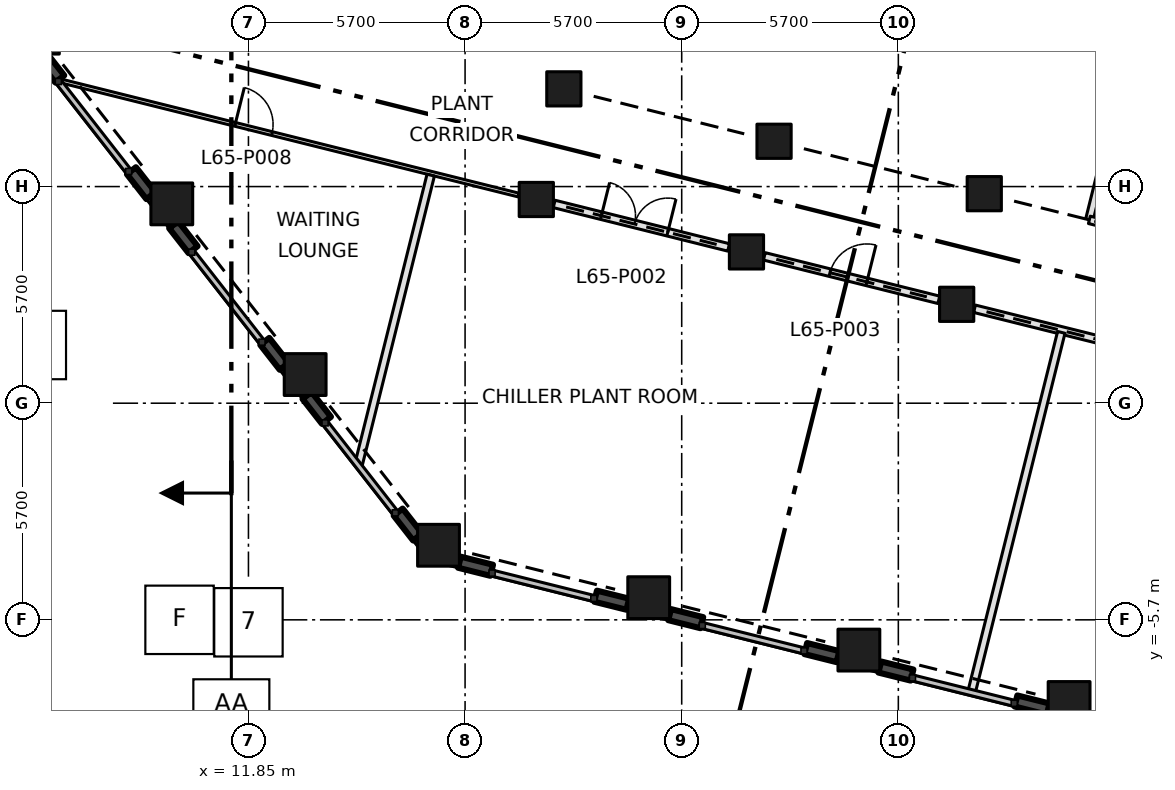
"""IFC4 building model, lengths in metres.
Left out: names, types, materials, properties, quantities, classifications, styles, units other than length and angle.
Written with IfcOpenShell. Run it as: python <this file> out.ifc"""

import sys

from ifc_helpers import new_model, si_unit, direction, frame, frame_2d, origin, origin_2d, place, context, subcontext, project, spatial, rectangle, extrude, element, fill, save


model = new_model("IFC4")
c1 = context("Model", 3, precision=1e-05, world=origin(), true_north=direction((0.0, 1.0)))
c2 = subcontext(c1, "Body", "Model", "MODEL_VIEW")
j1 = project(units=[si_unit("LENGTHUNIT", "METRE"), si_unit("PLANEANGLEUNIT", "RADIAN")], contexts=[c1])
p1 = place(None, origin())
s1 = spatial("IfcSite", under=j1, at=p1, CompositionType="ELEMENT")
p2 = place(p1, origin())
s2 = spatial("IfcBuilding", under=s1, at=p2, CompositionType="ELEMENT")
p3 = place(p2, frame((0.0, 0.0, 284.4)))
s3 = spatial("IfcBuildingStorey", under=s2, at=p3, CompositionType="ELEMENT", Elevation=284.4)
for number, where, z_axis, x_axis in (
    (1, (16.851, -3.738, 0.0), (0.0, 0.0, 1.0), (1.0, 0.0, 0.0)),
    (2, (13.342, 0.754, 0.0), (0.0, 0.0, 1.0), (1.0, 0.0, 0.0)),
    (3, (9.833, 5.245, 0.0), (0.0, 0.0, 1.0), (1.0, 0.0, 0.0)),
    (4, (6.323, 9.737, 0.0), (0.0, 0.0, 1.0), (1.0, 0.0, 0.0)),
    (5, (22.382, -5.117, 0.0), (0.0, 0.0, 1.0), (1.0, 0.0, 0.0)),
    (6, (27.912, -6.496, 0.0), (0.0, 0.0, 1.0), (1.0, 0.0, 0.0)),
    (7, (33.443, -7.875, 0.0), (0.0, 0.0, 1.0), (1.0, 0.0, 0.0)),
):
    element("IfcColumn", number, at=place(p3, frame(where, z_axis=z_axis, x_axis=x_axis)), inside=s3, PredefinedType="COLUMN", context=c2, shape_type="SweptSolid", body=[
        extrude(rectangle(XDim=1.1, YDim=1.1, at=origin_2d()), origin(), (0.0, 0.0, 1.0), 5.4),
    ])
for number, where, z_axis, x_axis in (
    (8, (19.424, 5.36, 0.0), (0.0, 0.0, 1.0), (1.0, 0.0, 0.0)),
    (9, (24.954, 3.981, 0.0), (0.0, 0.0, 1.0), (1.0, 0.0, 0.0)),
    (10, (30.485, 2.602, 0.0), (0.0, 0.0, 1.0), (1.0, 0.0, 0.0)),
    (11, (20.149, 8.271, 0.0), (0.0, 0.0, 1.0), (1.0, 0.0, 0.0)),
    (12, (25.68, 6.892, 0.0), (0.0, 0.0, 1.0), (1.0, 0.0, 0.0)),
    (13, (31.211, 5.513, 0.0), (0.0, 0.0, 1.0), (1.0, 0.0, 0.0)),
):
    element("IfcColumn", number, at=place(p3, frame(where, z_axis=z_axis, x_axis=x_axis)), inside=s3, PredefinedType="COLUMN", context=c2, shape_type="SweptSolid", body=[
        extrude(rectangle(XDim=0.9, YDim=0.9, at=origin_2d()), origin(), (0.0, 0.0, 1.0), 5.4),
    ])
p4 = place(p3, frame((6.822, 8.502, 0.0), z_axis=(0.0, 0.0, 1.0), x_axis=(0.97030423459, -0.241887768058, 0.0)))
e14 = element("IfcWall", 14, at=p4, inside=s3, PredefinedType="PARTITIONING", context=c2, shape_type="SweptSolid", body=[
    extrude(rectangle(XDim=12.503, YDim=0.1, at=frame_2d((6.252, 0.0))), origin(), (0.0, 0.0, 1.0), 5.1),
])
p5 = place(p4, frame((4.821, 0.0, 0.0)))
e15 = element("IfcOpeningElement", 15, at=p5, cuts=e14, PredefinedType="OPENING", context=c2, shape_type="SweptSolid", body=[
    extrude(rectangle(XDim=1.0, YDim=2.1, at=frame_2d((0.5, 1.05))), frame((0.0, 0.06, 0.0), z_axis=(0.0, -1.0, 0.0), x_axis=(1.0, 0.0, 0.0)), (0.0, 0.0, 1.0), 0.12),
])
p6 = place(p3, frame((19.894, 5.243, 0.0), z_axis=(0.0, 0.0, 1.0), x_axis=(0.970324390034, -0.241806902517, 0.0)))
e16 = element("IfcWall", 16, at=p6, inside=s3, PredefinedType="PARTITIONING", context=c2, shape_type="SweptSolid", body=[
    extrude(rectangle(XDim=4.73, YDim=0.2, at=frame_2d((2.365, 0.0))), origin(), (0.0, 0.0, 1.0), 2.61),
])
p7 = place(p6, frame((1.28, 0.0, 0.0)))
e17 = element("IfcOpeningElement", 17, at=p7, cuts=e16, PredefinedType="OPENING", context=c2, shape_type="SweptSolid", body=[
    extrude(rectangle(XDim=1.8, YDim=2.1, at=frame_2d((0.9, 1.05))), frame((0.0, 0.11, 0.0), z_axis=(0.0, -1.0, 0.0), x_axis=(1.0, 0.0, 0.0)), (0.0, 0.0, 1.0), 0.22),
])
p8 = place(p3, frame((25.424, 3.864, 0.0), z_axis=(0.0, 0.0, 1.0), x_axis=(0.970324351393, -0.241807057574, 0.0)))
e18 = element("IfcWall", 18, at=p8, inside=s3, PredefinedType="PARTITIONING", context=c2, shape_type="SweptSolid", body=[
    extrude(rectangle(XDim=4.731, YDim=0.2, at=frame_2d((2.366, 0.0))), origin(), (0.0, 0.0, 1.0), 2.61),
])
p9 = place(p8, frame((1.78, 0.0, 0.0)))
e19 = element("IfcOpeningElement", 19, at=p9, cuts=e18, PredefinedType="OPENING", context=c2, shape_type="SweptSolid", body=[
    extrude(rectangle(XDim=1.0, YDim=2.1, at=frame_2d((0.5, 1.05))), frame((0.0, 0.11, 0.0), z_axis=(0.0, -1.0, 0.0), x_axis=(1.0, 0.0, 0.0)), (0.0, 0.0, 1.0), 0.22),
])
p10 = place(p3, frame((30.955, 2.485, 0.0), z_axis=(0.0, 0.0, 1.0), x_axis=(0.970324351393, -0.241807057574, 0.0)))
e20 = element("IfcWall", 20, at=p10, inside=s3, PredefinedType="PARTITIONING", context=c2, shape_type="SweptSolid", body=[
    extrude(rectangle(XDim=4.731, YDim=0.2, at=frame_2d((2.366, 0.0))), origin(), (0.0, 0.0, 1.0), 2.61),
])
p11 = place(p3, frame((33.976, 4.824, 0.0), z_axis=(0.0, 0.0, 1.0), x_axis=(0.241940400058, 0.970291112409, 0.0)))
e21 = element("IfcWall", 21, at=p11, inside=s3, PredefinedType="PARTITIONING", context=c2, shape_type="SweptSolid", body=[
    extrude(rectangle(XDim=4.922, YDim=0.2, at=frame_2d((2.461, 0.0))), origin(), (0.0, 0.0, 1.0), 5.1),
])
p12 = place(p3, frame((36.272, 4.252, 0.0), z_axis=(0.0, 0.0, 1.0), x_axis=(-0.970336416584, 0.241758637182, 0.0)))
e22 = element("IfcWall", 22, at=p12, inside=s3, PredefinedType="PARTITIONING", context=c2, shape_type="SweptSolid", body=[
    extrude(rectangle(XDim=2.366, YDim=0.2, at=frame_2d((1.183, 0.0))), origin(), (0.0, 0.0, 1.0), 2.61),
])
p13 = place(p3, frame((14.741, -1.64, 0.0), z_axis=(0.0, 0.0, 1.0), x_axis=(0.241900964018, 0.970300944866, 0.0)))
e23 = element("IfcWall", 23, at=p13, inside=s3, PredefinedType="PARTITIONING", context=c2, shape_type="SweptSolid", body=[
    extrude(rectangle(XDim=7.875, YDim=0.2, at=frame_2d((3.938, 0.0))), origin(), (0.0, 0.0, 1.0), 5.1),
])
p14 = place(p3, frame((30.873, -7.621, 0.0), z_axis=(0.0, 0.0, 1.0), x_axis=(0.241947957391, 0.97028922797, 0.0)))
e24 = element("IfcWall", 24, at=p14, inside=s3, PredefinedType="PARTITIONING", context=c2, shape_type="SweptSolid", body=[
    extrude(rectangle(XDim=9.776, YDim=0.2, at=frame_2d((4.888, 0.0))), origin(), (0.0, 0.0, 1.0), 5.1),
])
p15 = place(p3, frame((6.373, 9.187, 2.5), z_axis=(0.0, 0.0, 1.0), x_axis=(0.615601945293, -0.788057259945, 0.0)))
e25 = element("IfcWall", 25, at=p15, inside=s3, PredefinedType="SOLIDWALL", context=c2, shape_type="SweptSolid", body=[
    extrude(rectangle(XDim=4.727, YDim=0.3, at=frame_2d((2.364, 0.0))), origin(), (0.0, 0.0, 1.0), 1.85),
])
for number, where, z_axis, x_axis in (
    (26, (6.373, 9.187, 0.0), (0.0, 0.0, 1.0), (0.616, -0.788, 0.0)),
    (27, (8.771, 6.117, 0.0), (0.0, 0.0, 1.0), (0.616, -0.788, 0.0)),
):
    element("IfcWall", number, at=place(p3, frame(where, z_axis=z_axis, x_axis=x_axis)), inside=s3, PredefinedType="SOLIDWALL", context=c2, shape_type="SweptSolid", body=[
        extrude(rectangle(XDim=0.831, YDim=0.3, at=frame_2d((0.416, 0.0))), origin(), (0.0, 0.0, 1.0), 2.5),
    ])
p16 = place(p3, frame((9.882, 4.695, 2.5), z_axis=(0.0, 0.0, 1.0), x_axis=(0.615702182059, -0.787978948328, 0.0)))
e28 = element("IfcWall", 28, at=p16, inside=s3, PredefinedType="SOLIDWALL", context=c2, shape_type="SweptSolid", body=[
    extrude(rectangle(XDim=4.726, YDim=0.3, at=frame_2d((2.363, 0.0))), origin(), (0.0, 0.0, 1.0), 1.85),
])
for number, where, z_axis, x_axis in (
    (29, (9.882, 4.695, 0.0), (0.0, 0.0, 1.0), (0.616, -0.788, 0.0)),
    (30, (12.28, 1.626, 0.0), (0.0, 0.0, 1.0), (0.616, -0.788, 0.0)),
):
    element("IfcWall", number, at=place(p3, frame(where, z_axis=z_axis, x_axis=x_axis)), inside=s3, PredefinedType="SOLIDWALL", context=c2, shape_type="SweptSolid", body=[
        extrude(rectangle(XDim=0.831, YDim=0.3, at=frame_2d((0.416, 0.0))), origin(), (0.0, 0.0, 1.0), 2.5),
    ])
p17 = place(p3, frame((13.391, 0.204, 2.5), z_axis=(0.0, 0.0, 1.0), x_axis=(0.615702182059, -0.787978948328, 0.0)))
e31 = element("IfcWall", 31, at=p17, inside=s3, PredefinedType="SOLIDWALL", context=c2, shape_type="SweptSolid", body=[
    extrude(rectangle(XDim=4.726, YDim=0.3, at=frame_2d((2.363, 0.0))), origin(), (0.0, 0.0, 1.0), 1.85),
])
for number, where, z_axis, x_axis in (
    (32, (13.391, 0.204, 0.0), (0.0, 0.0, 1.0), (0.616, -0.788, 0.0)),
    (33, (15.789, -2.865, 0.0), (0.0, 0.0, 1.0), (0.616, -0.788, 0.0)),
):
    element("IfcWall", number, at=place(p3, frame(where, z_axis=z_axis, x_axis=x_axis)), inside=s3, PredefinedType="SOLIDWALL", context=c2, shape_type="SweptSolid", body=[
        extrude(rectangle(XDim=0.831, YDim=0.3, at=frame_2d((0.416, 0.0))), origin(), (0.0, 0.0, 1.0), 2.5),
    ])
p18 = place(p3, frame((17.401, -4.184, 2.5), z_axis=(0.0, 0.0, 1.0), x_axis=(0.970286982272, -0.241956963183, 0.0)))
e34 = element("IfcWall", 34, at=p18, inside=s3, PredefinedType="SOLIDWALL", context=c2, shape_type="SweptSolid", body=[
    extrude(rectangle(XDim=4.567, YDim=0.3, at=frame_2d((2.283, 0.0))), origin(), (0.0, 0.0, 1.0), 1.85),
])
p19 = place(p3, frame((17.401, -4.184, 0.0), z_axis=(0.0, 0.0, 1.0), x_axis=(0.970175346246, -0.242404202804, 0.0)))
e35 = element("IfcWall", 35, at=p19, inside=s3, PredefinedType="SOLIDWALL", context=c2, shape_type="SweptSolid", body=[
    extrude(rectangle(XDim=0.874, YDim=0.3, at=frame_2d((0.437, 0.0))), origin(), (0.0, 0.0, 1.0), 2.5),
])
p20 = place(p3, frame((20.984, -5.078, 0.0), z_axis=(0.0, 0.0, 1.0), x_axis=(0.970372095453, -0.24161538934, 0.0)))
e36 = element("IfcWall", 36, at=p20, inside=s3, PredefinedType="SOLIDWALL", context=c2, shape_type="SweptSolid", body=[
    extrude(rectangle(XDim=0.874, YDim=0.3, at=frame_2d((0.437, 0.0))), origin(), (0.0, 0.0, 1.0), 2.5),
])
p21 = place(p3, frame((22.932, -5.563, 2.5), z_axis=(0.0, 0.0, 1.0), x_axis=(0.970274459658, -0.242007175378, 0.0)))
e37 = element("IfcWall", 37, at=p21, inside=s3, PredefinedType="SOLIDWALL", context=c2, shape_type="SweptSolid", body=[
    extrude(rectangle(XDim=4.566, YDim=0.3, at=frame_2d((2.283, 0.0))), origin(), (0.0, 0.0, 1.0), 1.85),
])
for number, where, z_axis, x_axis in (
    (38, (22.932, -5.563, 0.0), (0.0, 0.0, 1.0), (0.97, -0.242, 0.0)),
    (39, (26.514, -6.456, 0.0), (0.0, 0.0, 1.0), (0.97, -0.242, 0.0)),
):
    element("IfcWall", number, at=place(p3, frame(where, z_axis=z_axis, x_axis=x_axis)), inside=s3, PredefinedType="SOLIDWALL", context=c2, shape_type="SweptSolid", body=[
        extrude(rectangle(XDim=0.874, YDim=0.3, at=frame_2d((0.437, 0.0))), origin(), (0.0, 0.0, 1.0), 2.5),
    ])
p22 = place(p3, frame((28.462, -6.942, 2.5), z_axis=(0.0, 0.0, 1.0), x_axis=(0.970274430604, -0.242007291865, 0.0)))
e40 = element("IfcWall", 40, at=p22, inside=s3, PredefinedType="SOLIDWALL", context=c2, shape_type="SweptSolid", body=[
    extrude(rectangle(XDim=4.567, YDim=0.3, at=frame_2d((2.283, 0.0))), origin(), (0.0, 0.0, 1.0), 1.85),
])
p23 = place(p3, frame((28.462, -6.942, 0.0), z_axis=(0.0, 0.0, 1.0), x_axis=(0.970372095453, -0.24161538934, 0.0)))
e41 = element("IfcWall", 41, at=p23, inside=s3, PredefinedType="SOLIDWALL", context=c2, shape_type="SweptSolid", body=[
    extrude(rectangle(XDim=0.874, YDim=0.3, at=frame_2d((0.437, 0.0))), origin(), (0.0, 0.0, 1.0), 2.5),
])
p24 = place(p3, frame((32.045, -7.835, 0.0), z_axis=(0.0, 0.0, 1.0), x_axis=(0.970109638469, -0.242667033917, 0.0)))
e42 = element("IfcWall", 42, at=p24, inside=s3, PredefinedType="SOLIDWALL", context=c2, shape_type="SweptSolid", body=[
    extrude(rectangle(XDim=0.874, YDim=0.3, at=frame_2d((0.437, 0.0))), origin(), (0.0, 0.0, 1.0), 2.5),
])
p25 = place(p7, origin())
e43 = element("IfcDoor", 43, at=p25, inside=s3, OperationType="DOUBLE_DOOR_SINGLE_SWING", PredefinedType="DOOR", context=c2, shape_type="SweptSolid", body=[
    extrude(rectangle(XDim=1.8, YDim=2.1, at=frame_2d((0.9, 1.05))), frame((0.0, 0.025, 0.0), z_axis=(0.0, -1.0, 0.0), x_axis=(1.0, 0.0, 0.0)), (0.0, 0.0, 1.0), 0.05),
])
fill(e17, e43)
p26 = place(p9, origin())
e44 = element("IfcDoor", 44, at=p26, inside=s3, OperationType="SINGLE_SWING_RIGHT", PredefinedType="DOOR", context=c2, shape_type="SweptSolid", body=[
    extrude(rectangle(XDim=1.0, YDim=2.1, at=frame_2d((0.5, 1.05))), frame((0.0, 0.025, 0.0), z_axis=(0.0, -1.0, 0.0), x_axis=(1.0, 0.0, 0.0)), (0.0, 0.0, 1.0), 0.05),
])
fill(e19, e44)
p27 = place(p5, origin())
e45 = element("IfcDoor", 45, at=p27, inside=s3, OperationType="SINGLE_SWING_LEFT", PredefinedType="DOOR", context=c2, shape_type="SweptSolid", body=[
    extrude(rectangle(XDim=1.0, YDim=2.1, at=frame_2d((0.5, 1.05))), frame((0.0, 0.025, 0.0), z_axis=(0.0, -1.0, 0.0), x_axis=(1.0, 0.0, 0.0)), (0.0, 0.0, 1.0), 0.05),
])
fill(e15, e45)
save(model, sys.argv[1])
